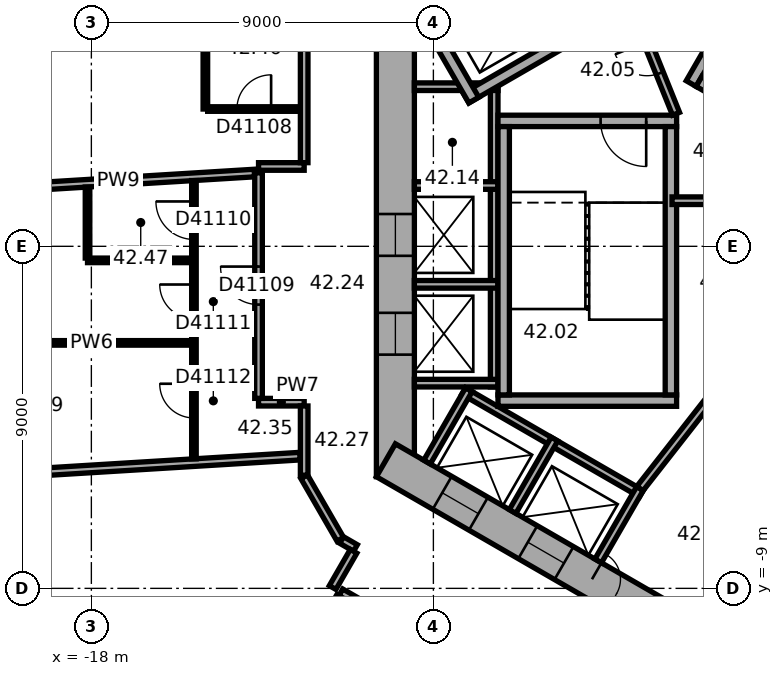
"""IFC4 building model, lengths in metres.
Left out: names, types, materials, properties, quantities, classifications, styles, units other than length and angle.
Written with IfcOpenShell. Run it as: python <this file> out.ifc"""

import sys

from ifc_helpers import new_model, si_unit, direction, frame, frame_2d, origin, place, context, subcontext, project, spatial, rectangle, extrude, element, fill, save


model = new_model("IFC4")
c1 = context("Model", 3, precision=1e-05, world=origin(), true_north=direction((0.0, 1.0)))
c2 = subcontext(c1, "Body", "Model", "MODEL_VIEW")
j1 = project(units=[si_unit("LENGTHUNIT", "METRE"), si_unit("PLANEANGLEUNIT", "RADIAN")], contexts=[c1])
p1 = place(None, origin())
s1 = spatial("IfcSite", under=j1, at=p1, CompositionType="ELEMENT")
p2 = place(p1, origin())
s2 = spatial("IfcBuilding", under=s1, at=p2, CompositionType="ELEMENT")
p3 = place(p2, frame((0.0, 0.0, 172.5)))
s3 = spatial("IfcBuildingStorey", under=s2, at=p3, CompositionType="ELEMENT", Elevation=172.5)
p4 = place(p3, frame((-10.0, 6.062, 0.0), z_axis=(0.0, 0.0, 1.0), x_axis=(0.0, -1.0, 0.0)))
e1 = element("IfcWall", 1, at=p4, inside=s3, PredefinedType="SHEAR", context=c2, shape_type="SweptSolid", body=[
    extrude(rectangle(XDim=12.125, YDim=1.0, at=frame_2d((6.062, 0.0))), origin(), (0.0, 0.0, 1.0), 3.7),
])
p5 = place(p4, frame((5.212, 0.0, 0.0)))
e2 = element("IfcOpeningElement", 2, at=p5, cuts=e1, PredefinedType="OPENING", context=c2, shape_type="SweptSolid", body=[
    extrude(rectangle(XDim=1.1, YDim=2.1, at=frame_2d((0.55, 1.05))), frame((0.0, 0.51, 0.0), z_axis=(0.0, -1.0, 0.0), x_axis=(1.0, 0.0, 0.0)), (0.0, 0.0, 1.0), 1.02),
])
p6 = place(p4, frame((7.812, 0.0, 0.0)))
e3 = element("IfcOpeningElement", 3, at=p6, cuts=e1, PredefinedType="OPENING", context=c2, shape_type="SweptSolid", body=[
    extrude(rectangle(XDim=1.1, YDim=2.1, at=frame_2d((0.55, 1.05))), frame((0.0, 0.51, 0.0), z_axis=(0.0, -1.0, 0.0), x_axis=(1.0, 0.0, 0.0)), (0.0, 0.0, 1.0), 1.02),
])
p7 = place(p3, frame((-10.25, -5.629, 0.0), z_axis=(0.0, 0.0, 1.0), x_axis=(0.866022616891, -0.50000482701, 0.0)))
e4 = element("IfcWall", 4, at=p7, inside=s3, PredefinedType="SHEAR", context=c2, shape_type="SweptSolid", body=[
    extrude(rectangle(XDim=12.125, YDim=1.0, at=frame_2d((6.062, 0.0))), origin(), (0.0, 0.0, 1.0), 3.7),
])
p8 = place(p7, frame((6.262, 0.0, 0.0)))
e5 = element("IfcOpeningElement", 5, at=p8, cuts=e4, PredefinedType="OPENING", context=c2, shape_type="SweptSolid", body=[
    extrude(rectangle(XDim=1.5, YDim=2.1, at=frame_2d((0.75, 1.05))), frame((0.0, 0.51, 0.0), z_axis=(0.0, -1.0, 0.0), x_axis=(1.0, 0.0, 0.0)), (0.0, 0.0, 1.0), 1.02),
])
p9 = place(p7, frame((1.712, 0.0, 0.0)))
e6 = element("IfcOpeningElement", 6, at=p9, cuts=e4, PredefinedType="OPENING", context=c2, shape_type="SweptSolid", body=[
    extrude(rectangle(XDim=1.1, YDim=2.1, at=frame_2d((0.55, 1.05))), frame((0.0, 0.51, 0.0), z_axis=(0.0, -1.0, 0.0), x_axis=(1.0, 0.0, 0.0)), (0.0, 0.0, 1.0), 1.02),
])
p10 = place(p7, frame((4.312, 0.0, 0.0)))
e7 = element("IfcOpeningElement", 7, at=p10, cuts=e4, PredefinedType="OPENING", context=c2, shape_type="SweptSolid", body=[
    extrude(rectangle(XDim=1.1, YDim=2.1, at=frame_2d((0.55, 1.05))), frame((0.0, 0.51, 0.0), z_axis=(0.0, -1.0, 0.0), x_axis=(1.0, 0.0, 0.0)), (0.0, 0.0, 1.0), 1.02),
])
p11 = place(p3, frame((-7.4, 4.3, 0.0), z_axis=(0.0, 0.0, 1.0), x_axis=(0.0, -1.0, 0.0)))
e8 = element("IfcWall", 8, at=p11, inside=s3, PredefinedType="PARTITIONING", context=c2, shape_type="SweptSolid", body=[
    extrude(rectangle(XDim=8.0, YDim=0.2, at=frame_2d((4.0, 0.0))), origin(), (0.0, 0.0, 1.0), 3.42),
])
for number, where, z_axis, x_axis in (
    (9, (-7.3, 4.2, 0.0), (0.0, 0.0, 1.0), (-1.0, 0.0, 0.0)),
    (10, (-7.3, 1.6, 0.0), (0.0, 0.0, 1.0), (-1.0, 0.0, 0.0)),
    (11, (-7.3, -1.0, 0.0), (0.0, 0.0, 1.0), (-1.0, 0.0, 0.0)),
    (12, (-7.3, -3.6, 0.0), (0.0, 0.0, 1.0), (-1.0, 0.0, 0.0)),
):
    element("IfcWall", number, at=place(p3, frame(where, z_axis=z_axis, x_axis=x_axis)), inside=s3, PredefinedType="PARTITIONING", context=c2, shape_type="SweptSolid", body=[
        extrude(rectangle(XDim=2.2, YDim=0.2, at=frame_2d((1.1, 0.0))), origin(), (0.0, 0.0, 1.0), 3.42),
    ])
p12 = place(p3, frame((-8.203, -3.809, 0.0), z_axis=(0.0, 0.0, 1.0), x_axis=(0.866028230842, -0.499995103361, 0.0)))
e13 = element("IfcWall", 13, at=p12, inside=s3, PredefinedType="PARTITIONING", context=c2, shape_type="SweptSolid", body=[
    extrude(rectangle(XDim=5.4, YDim=0.2, at=frame_2d((2.7, 0.0))), origin(), (0.0, 0.0, 1.0), 3.42),
])
for number, where, z_axis, x_axis in (
    (14, (-8.067, -3.772, 0.0), (0.0, 0.0, 1.0), (-0.5, -0.866, 0.0)),
    (15, (-5.815, -5.072, 0.0), (0.0, 0.0, 1.0), (-0.5, -0.866, 0.0)),
):
    element("IfcWall", number, at=place(p3, frame(where, z_axis=z_axis, x_axis=x_axis)), inside=s3, PredefinedType="PARTITIONING", context=c2, shape_type="SweptSolid", body=[
        extrude(rectangle(XDim=2.2, YDim=0.2, at=frame_2d((1.1, 0.0))), origin(), (0.0, 0.0, 1.0), 3.42),
    ])
p13 = place(p3, frame((-3.563, -6.372, 0.0), z_axis=(0.0, 0.0, 1.0), x_axis=(-0.499994660107, -0.866028486751, 0.0)))
e16 = element("IfcWall", 16, at=p13, inside=s3, PredefinedType="PARTITIONING", context=c2, shape_type="SweptSolid", body=[
    extrude(rectangle(XDim=2.2, YDim=0.2, at=frame_2d((1.1, 0.0))), origin(), (0.0, 0.0, 1.0), 3.42),
])
p14 = place(p3, frame((-2.216, 4.282, 0.0), z_axis=(0.0, 0.0, 1.0), x_axis=(0.499977259774, 0.866038532462, 0.0)))
e17 = element("IfcWall", 17, at=p14, inside=s3, PredefinedType="SHEAR", context=c2, shape_type="SweptSolid", body=[
    extrude(rectangle(XDim=4.7, YDim=0.3, at=frame_2d((2.35, 0.0))), origin(), (0.0, 0.0, 1.0), 3.42),
])
p15 = place(p3, frame((4.103, 0.807, 0.0), z_axis=(0.0, 0.0, 1.0), x_axis=(-0.866027801685, 0.499995846692, 0.0)))
e18 = element("IfcWall", 18, at=p15, inside=s3, PredefinedType="SHEAR", context=c2, shape_type="SweptSolid", body=[
    extrude(rectangle(XDim=7.06, YDim=0.3, at=frame_2d((3.53, 0.0))), origin(), (0.0, 0.0, 1.0), 3.42),
])
p16 = place(p3, frame((-2.6, 3.3, 0.0), z_axis=(0.0, 0.0, 1.0), x_axis=(-1.0, 0.0, 0.0)))
e19 = element("IfcWall", 19, at=p16, inside=s3, PredefinedType="SHEAR", context=c2, shape_type="SweptSolid", body=[
    extrude(rectangle(XDim=4.7, YDim=0.3, at=frame_2d((2.35, 0.0))), origin(), (0.0, 0.0, 1.0), 3.42),
])
p17 = place(p16, frame((0.8, 0.0, 0.0)))
e20 = element("IfcOpeningElement", 20, at=p17, cuts=e19, PredefinedType="OPENING", context=c2, shape_type="SweptSolid", body=[
    extrude(rectangle(XDim=1.2, YDim=2.1, at=frame_2d((0.6, 1.05))), frame((0.0, 0.16, 0.0), z_axis=(0.0, -1.0, 0.0), x_axis=(1.0, 0.0, 0.0)), (0.0, 0.0, 1.0), 0.32),
])
p18 = place(p3, frame((-2.6, -4.06, 0.0), z_axis=(0.0, 0.0, 1.0), x_axis=(-1.0, 0.0, 0.0)))
e21 = element("IfcWall", 21, at=p18, inside=s3, PredefinedType="SHEAR", context=c2, shape_type="SweptSolid", body=[
    extrude(rectangle(XDim=4.7, YDim=0.3, at=frame_2d((2.35, 0.0))), origin(), (0.0, 0.0, 1.0), 3.42),
])
for number, where, z_axis, x_axis in (
    (22, (-2.75, 3.15, 0.0), (0.0, 0.0, 1.0), (0.0, -1.0, 0.0)),
    (23, (-7.15, 3.15, 0.0), (0.0, 0.0, 1.0), (0.0, -1.0, 0.0)),
):
    element("IfcWall", number, at=place(p3, frame(where, z_axis=z_axis, x_axis=x_axis)), inside=s3, PredefinedType="SHEAR", context=c2, shape_type="SweptSolid", body=[
        extrude(rectangle(XDim=7.06, YDim=0.3, at=frame_2d((3.53, 0.0))), origin(), (0.0, 0.0, 1.0), 3.42),
    ])
p19 = place(p3, frame((-5.24, 5.577, 0.0), z_axis=(0.0, 0.0, 1.0), x_axis=(-0.866014461049, -0.500018952895, 0.0)))
e24 = element("IfcWall", 24, at=p19, inside=s3, PredefinedType="SHEAR", context=c2, shape_type="SweptSolid", body=[
    extrude(rectangle(XDim=3.35, YDim=0.3, at=frame_2d((1.675, 0.0))), origin(), (0.0, 0.0, 1.0), 3.42),
])
p20 = place(p3, frame((-7.937, 3.847, 0.0), z_axis=(0.0, 0.0, 1.0), x_axis=(-0.50002983664, 0.866008176907, 0.0)))
e25 = element("IfcWall", 25, at=p20, inside=s3, PredefinedType="SHEAR", context=c2, shape_type="SweptSolid", body=[
    extrude(rectangle(XDim=2.2, YDim=0.3, at=frame_2d((1.1, 0.0))), origin(), (0.0, 0.0, 1.0), 3.42),
])
p21 = place(p3, frame((-2.615, 3.487, 0.0), z_axis=(0.0, 0.0, 1.0), x_axis=(-0.373576831041, 0.92759924068, 0.0)))
e26 = element("IfcWall", 26, at=p21, inside=s3, PredefinedType="PARTITIONING", context=c2, shape_type="SweptSolid", body=[
    extrude(rectangle(XDim=3.002, YDim=0.2, at=frame_2d((1.501, 0.0))), origin(), (0.0, 0.0, 1.0), 3.42),
])
p22 = place(p21, frame((1.15, 0.0, 0.0)))
e27 = element("IfcOpeningElement", 27, at=p22, cuts=e26, PredefinedType="OPENING", context=c2, shape_type="SweptSolid", body=[
    extrude(rectangle(XDim=0.9, YDim=2.1, at=frame_2d((0.45, 1.05))), frame((0.0, 0.11, 0.0), z_axis=(0.0, -1.0, 0.0), x_axis=(1.0, 0.0, 0.0)), (0.0, 0.0, 1.0), 0.22),
])
p23 = place(p3, frame((-1.712, -4.008, 0.0), z_axis=(0.0, 0.0, 1.0), x_axis=(-0.616549420702, -0.787316208287, 0.0)))
e28 = element("IfcWall", 28, at=p23, inside=s3, PredefinedType="PARTITIONING", context=c2, shape_type="SweptSolid", body=[
    extrude(rectangle(XDim=3.002, YDim=0.2, at=frame_2d((1.501, 0.0))), origin(), (0.0, 0.0, 1.0), 3.42),
])
p24 = place(p3, frame((-2.72, 1.2, 0.0), z_axis=(0.0, 0.0, 1.0), x_axis=(1.0, 0.0, 0.0)))
e29 = element("IfcWall", 29, at=p24, inside=s3, PredefinedType="PARTITIONING", context=c2, shape_type="SweptSolid", body=[
    extrude(rectangle(XDim=5.961, YDim=0.2, at=frame_2d((2.981, 0.0))), origin(), (0.0, 0.0, 1.0), 3.42),
])
p25 = place(p3, frame((-20.88, 1.49, 0.0), z_axis=(0.0, 0.0, 1.0), x_axis=(0.998134881975, 0.061047173439, 0.0)))
e30 = element("IfcWall", 30, at=p25, inside=s3, PredefinedType="PARTITIONING", context=c2, shape_type="SweptSolid", body=[
    extrude(rectangle(XDim=7.183, YDim=0.2, at=frame_2d((3.591, 0.0))), origin(), (0.0, 0.0, 1.0), 2.87),
])
p26 = place(p3, frame((-20.633, -2.541, 0.0), z_axis=(0.0, 0.0, 1.0), x_axis=(1.0, 0.0, 0.0)))
e31 = element("IfcWall", 31, at=p26, inside=s3, PredefinedType="PARTITIONING", context=c2, shape_type="SweptSolid", body=[
    extrude(rectangle(XDim=5.272, YDim=0.12, at=frame_2d((2.636, 0.0))), origin(), (0.0, 0.0, 1.0), 3.42),
])
p27 = place(p3, frame((-20.421, -6.005, 0.0), z_axis=(0.0, 0.0, 1.0), x_axis=(0.998134865741, 0.061047438866, 0.0)))
e32 = element("IfcWall", 32, at=p27, inside=s3, PredefinedType="PARTITIONING", context=c2, shape_type="SweptSolid", body=[
    extrude(rectangle(XDim=7.927, YDim=0.2, at=frame_2d((3.963, 0.0))), origin(), (0.0, 0.0, 1.0), 2.87),
])
p28 = place(p3, frame((-18.101, -0.369, 0.0), z_axis=(0.0, 0.0, 1.0), x_axis=(1.0, 0.0, 0.0)))
e33 = element("IfcWall", 33, at=p28, inside=s3, PredefinedType="PARTITIONING", context=c2, shape_type="SweptSolid", body=[
    extrude(rectangle(XDim=2.74, YDim=0.12, at=frame_2d((1.37, 0.0))), origin(), (0.0, 0.0, 1.0), 3.42),
])
p29 = place(p3, frame((-18.101, 1.559, 0.0), z_axis=(0.0, 0.0, 1.0), x_axis=(0.0, -1.0, 0.0)))
e34 = element("IfcWall", 34, at=p29, inside=s3, PredefinedType="PARTITIONING", context=c2, shape_type="SweptSolid", body=[
    extrude(rectangle(XDim=1.869, YDim=0.12, at=frame_2d((0.934, 0.0))), origin(), (0.0, 0.0, 1.0), 3.42),
])
p30 = place(p3, frame((-15.301, 1.731, 0.0), z_axis=(0.0, 0.0, 1.0), x_axis=(0.0, -1.0, 0.0)))
e35 = element("IfcWall", 35, at=p30, inside=s3, PredefinedType="PARTITIONING", context=c2, shape_type="SweptSolid", body=[
    extrude(rectangle(XDim=7.322, YDim=0.12, at=frame_2d((3.661, 0.0))), origin(), (0.0, 0.0, 1.0), 3.42),
])
p31 = place(p30, frame((0.55, 0.0, 0.0)))
e36 = element("IfcOpeningElement", 36, at=p31, cuts=e35, PredefinedType="OPENING", context=c2, shape_type="SweptSolid", body=[
    extrude(rectangle(XDim=1.0, YDim=2.1, at=frame_2d((0.5, 1.05))), frame((0.0, 0.07, 0.0), z_axis=(0.0, -1.0, 0.0), x_axis=(1.0, 0.0, 0.0)), (0.0, 0.0, 1.0), 0.14),
])
p32 = place(p30, frame((2.736, 0.0, 0.0)))
e37 = element("IfcOpeningElement", 37, at=p32, cuts=e35, PredefinedType="OPENING", context=c2, shape_type="SweptSolid", body=[
    extrude(rectangle(XDim=0.9, YDim=2.1, at=frame_2d((0.45, 1.05))), frame((0.0, 0.07, 0.0), z_axis=(0.0, -1.0, 0.0), x_axis=(1.0, 0.0, 0.0)), (0.0, 0.0, 1.0), 0.14),
])
p33 = place(p30, frame((5.347, 0.0, 0.0)))
e38 = element("IfcOpeningElement", 38, at=p33, cuts=e35, PredefinedType="OPENING", context=c2, shape_type="SweptSolid", body=[
    extrude(rectangle(XDim=0.9, YDim=2.1, at=frame_2d((0.45, 1.05))), frame((0.0, 0.07, 0.0), z_axis=(0.0, -1.0, 0.0), x_axis=(1.0, 0.0, 0.0)), (0.0, 0.0, 1.0), 0.14),
])
p34 = place(p3, frame((-15.0, 3.612, 0.0), z_axis=(0.0, 0.0, 1.0), x_axis=(0.0, 1.0, 0.0)))
e39 = element("IfcWall", 39, at=p34, inside=s3, PredefinedType="PARTITIONING", context=c2, shape_type="SweptSolid", body=[
    extrude(rectangle(XDim=2.2, YDim=0.12, at=frame_2d((1.1, 0.0))), origin(), (0.0, 0.0, 1.0), 3.42),
])
p35 = place(p3, frame((-13.601, -4.101, 0.0), z_axis=(0.0, 0.0, 1.0), x_axis=(1.0, 0.0, 0.0)))
e40 = element("IfcWall", 40, at=p35, inside=s3, PredefinedType="PARTITIONING", context=c2, shape_type="SweptSolid", body=[
    extrude(rectangle(XDim=1.201, YDim=0.2, at=frame_2d((0.601, 0.0))), origin(), (0.0, 0.0, 1.0), 3.42),
])
p36 = place(p3, frame((-13.601, 1.935, 0.0), z_axis=(0.0, 0.0, 1.0), x_axis=(0.0, -1.0, 0.0)))
e41 = element("IfcWall", 41, at=p36, inside=s3, PredefinedType="PARTITIONING", context=c2, shape_type="SweptSolid", body=[
    extrude(rectangle(XDim=5.936, YDim=0.2, at=frame_2d((2.968, 0.0))), origin(), (0.0, 0.0, 1.0), 3.42),
])
p37 = place(p36, frame((2.468, 0.0, 0.0)))
e42 = element("IfcOpeningElement", 42, at=p37, cuts=e41, PredefinedType="OPENING", context=c2, shape_type="SweptSolid", body=[
    extrude(rectangle(XDim=1.0, YDim=2.1, at=frame_2d((0.5, 1.05))), frame((0.0, 0.11, 0.0), z_axis=(0.0, -1.0, 0.0), x_axis=(1.0, 0.0, 0.0)), (0.0, 0.0, 1.0), 0.22),
])
p38 = place(p3, frame((-13.035, -11.875, 0.0), z_axis=(0.0, 0.0, 1.0), x_axis=(0.500026960575, 0.86600983753, 0.0)))
e43 = element("IfcWall", 43, at=p38, inside=s3, PredefinedType="PARTITIONING", context=c2, shape_type="SweptSolid", body=[
    extrude(rectangle(XDim=3.1, YDim=0.12, at=frame_2d((1.55, 0.0))), origin(), (0.0, 0.0, 1.0), 3.42),
])
p39 = place(p3, frame((-12.5, 3.612, 0.0), z_axis=(0.0, 0.0, 1.0), x_axis=(-1.0, 0.0, 0.0)))
e44 = element("IfcWall", 44, at=p39, inside=s3, PredefinedType="PARTITIONING", context=c2, shape_type="SweptSolid", body=[
    extrude(rectangle(XDim=2.44, YDim=0.12, at=frame_2d((1.22, 0.0))), origin(), (0.0, 0.0, 1.0), 3.42),
])
p40 = place(p39, frame((0.77, 0.0, 0.0)))
e45 = element("IfcOpeningElement", 45, at=p40, cuts=e44, PredefinedType="OPENING", context=c2, shape_type="SweptSolid", body=[
    extrude(rectangle(XDim=0.9, YDim=2.1, at=frame_2d((0.45, 1.05))), frame((0.0, 0.07, 0.0), z_axis=(0.0, -1.0, 0.0), x_axis=(1.0, 0.0, 0.0)), (0.0, 0.0, 1.0), 0.14),
])
p41 = place(p3, frame((-12.4, -6.062, 0.0), z_axis=(0.0, 0.0, 1.0), x_axis=(0.500022797313, -0.86601224135, 0.0)))
e46 = element("IfcWall", 46, at=p41, inside=s3, PredefinedType="PARTITIONING", context=c2, shape_type="SweptSolid", body=[
    extrude(rectangle(XDim=1.9, YDim=0.2, at=frame_2d((0.95, 0.0))), origin(), (0.0, 0.0, 1.0), 3.42),
])
p42 = place(p3, frame((-12.4, -4.201, 0.0), z_axis=(0.0, 0.0, 1.0), x_axis=(0.0, -1.0, 0.0)))
e47 = element("IfcWall", 47, at=p42, inside=s3, PredefinedType="PARTITIONING", context=c2, shape_type="SweptSolid", body=[
    extrude(rectangle(XDim=1.821, YDim=0.2, at=frame_2d((0.911, 0.0))), origin(), (0.0, 0.0, 1.0), 3.42),
])
p43 = place(p3, frame((-12.4, 2.101, 0.0), z_axis=(0.0, 0.0, 1.0), x_axis=(-1.0, 0.0, 0.0)))
e48 = element("IfcWall", 48, at=p43, inside=s3, PredefinedType="PARTITIONING", context=c2, shape_type="SweptSolid", body=[
    extrude(rectangle(XDim=1.201, YDim=0.2, at=frame_2d((0.601, 0.0))), origin(), (0.0, 0.0, 1.0), 3.42),
])
p44 = place(p3, frame((-12.4, 5.812, 0.0), z_axis=(0.0, 0.0, 1.0), x_axis=(0.0, -1.0, 0.0)))
e49 = element("IfcWall", 49, at=p44, inside=s3, PredefinedType="PARTITIONING", context=c2, shape_type="SweptSolid", body=[
    extrude(rectangle(XDim=3.611, YDim=0.2, at=frame_2d((1.806, 0.0))), origin(), (0.0, 0.0, 1.0), 3.42),
])
p45 = place(p3, frame((-11.435, -9.103, 0.0), z_axis=(0.0, 0.0, 1.0), x_axis=(0.866007399799, -0.500031182522, 0.0)))
e50 = element("IfcWall", 50, at=p45, inside=s3, PredefinedType="PARTITIONING", context=c2, shape_type="SweptSolid", body=[
    extrude(rectangle(XDim=4.358, YDim=0.2, at=frame_2d((2.179, 0.0))), origin(), (0.0, 0.0, 1.0), 3.42),
])
p46 = place(p3, frame((-11.415, -7.728, 0.0), z_axis=(0.0, 0.0, 1.0), x_axis=(0.865915281873, -0.500190688257, 0.0)))
e51 = element("IfcWall", 51, at=p46, inside=s3, PredefinedType="PARTITIONING", context=c2, shape_type="SweptSolid", body=[
    extrude(rectangle(XDim=0.421, YDim=0.2, at=frame_2d((0.21, 0.0))), origin(), (0.0, 0.0, 1.0), 3.42),
])
p47 = place(p3, frame((-11.101, -8.025, 0.0), z_axis=(0.0, 0.0, 1.0), x_axis=(-0.500074377092, -0.865982457891, 0.0)))
e52 = element("IfcWall", 52, at=p47, inside=s3, PredefinedType="PARTITIONING", context=c2, shape_type="SweptSolid", body=[
    extrude(rectangle(XDim=1.101, YDim=0.2, at=frame_2d((0.55, 0.0))), origin(), (0.0, 0.0, 1.0), 3.42),
])
p48 = place(p8, origin())
e53 = element("IfcDoor", 53, at=p48, inside=s3, OperationType="DOUBLE_DOOR_SINGLE_SWING", PredefinedType="DOOR", context=c2, shape_type="SweptSolid", body=[
    extrude(rectangle(XDim=1.5, YDim=2.1, at=frame_2d((0.75, 1.05))), frame((0.0, 0.025, 0.0), z_axis=(0.0, -1.0, 0.0), x_axis=(1.0, 0.0, 0.0)), (0.0, 0.0, 1.0), 0.05),
])
fill(e5, e53)
p49 = place(p17, origin())
e54 = element("IfcDoor", 54, at=p49, inside=s3, OperationType="SINGLE_SWING_RIGHT", PredefinedType="DOOR", context=c2, shape_type="SweptSolid", body=[
    extrude(rectangle(XDim=1.2, YDim=2.1, at=frame_2d((0.6, 1.05))), frame((0.0, 0.025, 0.0), z_axis=(0.0, -1.0, 0.0), x_axis=(1.0, 0.0, 0.0)), (0.0, 0.0, 1.0), 0.05),
])
fill(e20, e54)
p50 = place(p22, origin())
e55 = element("IfcDoor", 55, at=p50, inside=s3, OperationType="SINGLE_SWING_LEFT", PredefinedType="DOOR", context=c2, shape_type="SweptSolid", body=[
    extrude(rectangle(XDim=0.9, YDim=2.1, at=frame_2d((0.45, 1.05))), frame((0.0, 0.025, 0.0), z_axis=(0.0, -1.0, 0.0), x_axis=(1.0, 0.0, 0.0)), (0.0, 0.0, 1.0), 0.05),
])
fill(e27, e55)
p51 = place(p5, origin())
e56 = element("IfcDoor", 56, at=p51, inside=s3, OperationType="DOUBLE_DOOR_SLIDING", PredefinedType="DOOR", context=c2, shape_type="SweptSolid", body=[
    extrude(rectangle(XDim=1.1, YDim=2.1, at=frame_2d((0.55, 1.05))), frame((0.0, 0.025, 0.0), z_axis=(0.0, -1.0, 0.0), x_axis=(1.0, 0.0, 0.0)), (0.0, 0.0, 1.0), 0.05),
])
fill(e2, e56)
p52 = place(p6, origin())
e57 = element("IfcDoor", 57, at=p52, inside=s3, OperationType="DOUBLE_DOOR_SLIDING", PredefinedType="DOOR", context=c2, shape_type="SweptSolid", body=[
    extrude(rectangle(XDim=1.1, YDim=2.1, at=frame_2d((0.55, 1.05))), frame((0.0, 0.025, 0.0), z_axis=(0.0, -1.0, 0.0), x_axis=(1.0, 0.0, 0.0)), (0.0, 0.0, 1.0), 0.05),
])
fill(e3, e57)
p53 = place(p9, origin())
e58 = element("IfcDoor", 58, at=p53, inside=s3, OperationType="DOUBLE_DOOR_SLIDING", PredefinedType="DOOR", context=c2, shape_type="SweptSolid", body=[
    extrude(rectangle(XDim=1.1, YDim=2.1, at=frame_2d((0.55, 1.05))), frame((0.0, 0.025, 0.0), z_axis=(0.0, -1.0, 0.0), x_axis=(1.0, 0.0, 0.0)), (0.0, 0.0, 1.0), 0.05),
])
fill(e6, e58)
p54 = place(p10, origin())
e59 = element("IfcDoor", 59, at=p54, inside=s3, OperationType="DOUBLE_DOOR_SLIDING", PredefinedType="DOOR", context=c2, shape_type="SweptSolid", body=[
    extrude(rectangle(XDim=1.1, YDim=2.1, at=frame_2d((0.55, 1.05))), frame((0.0, 0.025, 0.0), z_axis=(0.0, -1.0, 0.0), x_axis=(1.0, 0.0, 0.0)), (0.0, 0.0, 1.0), 0.05),
])
fill(e7, e59)
p55 = place(p40, origin())
e60 = element("IfcDoor", 60, at=p55, inside=s3, OperationType="SINGLE_SWING_LEFT", PredefinedType="DOOR", context=c2, shape_type="SweptSolid", body=[
    extrude(rectangle(XDim=0.9, YDim=2.1, at=frame_2d((0.45, 1.05))), frame((0.0, 0.025, 0.0), z_axis=(0.0, -1.0, 0.0), x_axis=(1.0, 0.0, 0.0)), (0.0, 0.0, 1.0), 0.05),
])
fill(e45, e60)
p56 = place(p37, origin())
e61 = element("IfcDoor", 61, at=p56, inside=s3, OperationType="SINGLE_SWING_LEFT", PredefinedType="DOOR", context=c2, shape_type="SweptSolid", body=[
    extrude(rectangle(XDim=1.0, YDim=2.1, at=frame_2d((0.5, 1.05))), frame((0.0, 0.025, 0.0), z_axis=(0.0, -1.0, 0.0), x_axis=(1.0, 0.0, 0.0)), (0.0, 0.0, 1.0), 0.05),
])
fill(e42, e61)
p57 = place(p31, origin())
e62 = element("IfcDoor", 62, at=p57, inside=s3, OperationType="SINGLE_SWING_LEFT", PredefinedType="DOOR", context=c2, shape_type="SweptSolid", body=[
    extrude(rectangle(XDim=1.0, YDim=2.1, at=frame_2d((0.5, 1.05))), frame((0.0, 0.025, 0.0), z_axis=(0.0, -1.0, 0.0), x_axis=(1.0, 0.0, 0.0)), (0.0, 0.0, 1.0), 0.05),
])
fill(e36, e62)
p58 = place(p32, origin())
e63 = element("IfcDoor", 63, at=p58, inside=s3, OperationType="SINGLE_SWING_LEFT", PredefinedType="DOOR", context=c2, shape_type="SweptSolid", body=[
    extrude(rectangle(XDim=0.9, YDim=2.1, at=frame_2d((0.45, 1.05))), frame((0.0, 0.025, 0.0), z_axis=(0.0, -1.0, 0.0), x_axis=(1.0, 0.0, 0.0)), (0.0, 0.0, 1.0), 0.05),
])
fill(e37, e63)
p59 = place(p33, origin())
e64 = element("IfcDoor", 64, at=p59, inside=s3, OperationType="SINGLE_SWING_LEFT", PredefinedType="DOOR", context=c2, shape_type="SweptSolid", body=[
    extrude(rectangle(XDim=0.9, YDim=2.1, at=frame_2d((0.45, 1.05))), frame((0.0, 0.025, 0.0), z_axis=(0.0, -1.0, 0.0), x_axis=(1.0, 0.0, 0.0)), (0.0, 0.0, 1.0), 0.05),
])
fill(e38, e64)
save(model, sys.argv[1])
